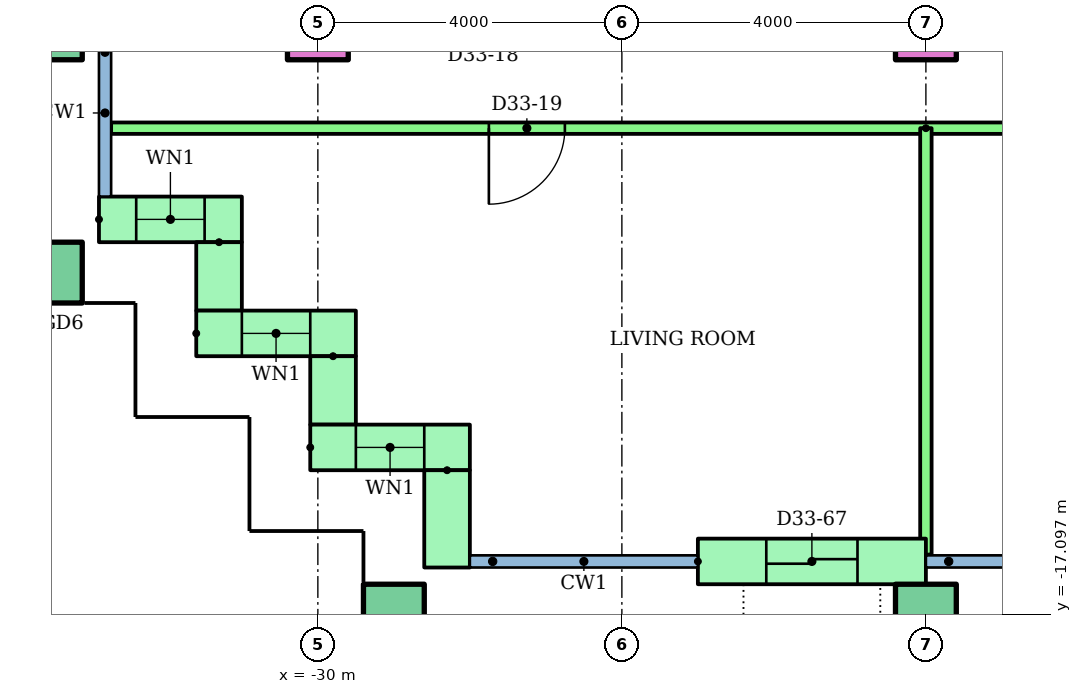
"""IFC4 building model, lengths in metres.
Left out: names, types, materials, properties, quantities, classifications, styles, units other than length and angle.
Written with IfcOpenShell. Run it as: python <this file> out.ifc"""

import sys

from ifc_helpers import new_model, si_unit, direction, frame, frame_2d, origin, origin_2d, place, context, subcontext, project, spatial, rectangle, hollow_rectangle, extrude, element, fill, save


model = new_model("IFC4")
c1 = context("Model", 3, precision=1e-05, world=origin(), true_north=direction((0.0, 1.0)))
c2 = subcontext(c1, "Body", "Model", "MODEL_VIEW")
j1 = project(units=[si_unit("LENGTHUNIT", "METRE"), si_unit("PLANEANGLEUNIT", "RADIAN")], contexts=[c1])
p1 = place(None, origin())
s1 = spatial("IfcSite", under=j1, at=p1, CompositionType="ELEMENT")
p2 = place(p1, origin())
s2 = spatial("IfcBuilding", under=s1, at=p2, CompositionType="ELEMENT")
p3 = place(p2, frame((0.0, 0.0, 129.4)))
s3 = spatial("IfcBuildingStorey", under=s2, at=p3, CompositionType="ELEMENT", Elevation=129.4)
for number, where in (
    (1, (-29.0, -17.1, 0.0)),
    (2, (-22.0, -17.1, 0.0)),
    (3, (-33.5, -12.6, 0.0)),
    (4, (-33.5, -9.4, 0.0)),
):
    element("IfcColumn", number, at=place(p3, frame(where)), inside=s3, PredefinedType="COLUMN", context=c2, shape_type="SweptSolid", body=[
        extrude(hollow_rectangle(XDim=0.8, YDim=0.8, WallThickness=0.04, at=origin_2d()), origin(), (0.0, 0.0, 1.0), 3.2),
    ])
for number, where in (
    (5, (-30.0, -9.4, 0.0)),
    (6, (-22.0, -9.4, 0.0)),
):
    element("IfcColumn", number, at=place(p3, frame(where)), inside=s3, PredefinedType="COLUMN", context=c2, shape_type="SweptSolid", body=[
        extrude(rectangle(XDim=0.8, YDim=0.8, at=origin_2d()), origin(), (0.0, 0.0, 1.0), 3.2),
    ])
p4 = place(p3, frame((-32.88, -11.9, 0.0)))
e7 = element("IfcWall", 7, at=p4, inside=s3, PredefinedType="STANDARD", context=c2, shape_type="SweptSolid", body=[
    extrude(rectangle(XDim=1.88, YDim=0.6, at=frame_2d((0.94, 0.0))), origin(), (0.0, 0.0, 1.0), 2.92),
])
p5 = place(p4, frame((0.49, 0.0, 0.9)))
e8 = element("IfcOpeningElement", 8, at=p5, cuts=e7, PredefinedType="OPENING", context=c2, shape_type="SweptSolid", body=[
    extrude(rectangle(XDim=0.9, YDim=1.5, at=frame_2d((0.45, 0.75))), frame((0.0, 0.31, 0.0), z_axis=(0.0, -1.0, 0.0), x_axis=(1.0, 0.0, 0.0)), (0.0, 0.0, 1.0), 0.62),
])
p6 = place(p3, frame((-31.3, -12.2, 0.0), z_axis=(0.0, 0.0, 1.0), x_axis=(0.0, -1.0, 0.0)))
e9 = element("IfcWall", 9, at=p6, inside=s3, PredefinedType="STANDARD", context=c2, shape_type="SweptSolid", body=[
    extrude(rectangle(XDim=0.9, YDim=0.6, at=frame_2d((0.45, 0.0))), origin(), (0.0, 0.0, 1.0), 2.92),
])
p7 = place(p3, frame((-31.6, -13.4, 0.0)))
e10 = element("IfcWall", 10, at=p7, inside=s3, PredefinedType="STANDARD", context=c2, shape_type="SweptSolid", body=[
    extrude(rectangle(XDim=2.1, YDim=0.6, at=frame_2d((1.05, 0.0))), origin(), (0.0, 0.0, 1.0), 2.92),
])
p8 = place(p7, frame((0.6, 0.0, 0.9)))
e11 = element("IfcOpeningElement", 11, at=p8, cuts=e10, PredefinedType="OPENING", context=c2, shape_type="SweptSolid", body=[
    extrude(rectangle(XDim=0.9, YDim=1.5, at=frame_2d((0.45, 0.75))), frame((0.0, 0.31, 0.0), z_axis=(0.0, -1.0, 0.0), x_axis=(1.0, 0.0, 0.0)), (0.0, 0.0, 1.0), 0.62),
])
p9 = place(p3, frame((-29.8, -13.7, 0.0), z_axis=(0.0, 0.0, 1.0), x_axis=(0.0, -1.0, 0.0)))
e12 = element("IfcWall", 12, at=p9, inside=s3, PredefinedType="STANDARD", context=c2, shape_type="SweptSolid", body=[
    extrude(rectangle(XDim=0.9, YDim=0.6, at=frame_2d((0.45, 0.0))), origin(), (0.0, 0.0, 1.0), 2.92),
])
p10 = place(p3, frame((-30.1, -14.9, 0.0)))
e13 = element("IfcWall", 13, at=p10, inside=s3, PredefinedType="STANDARD", context=c2, shape_type="SweptSolid", body=[
    extrude(rectangle(XDim=2.1, YDim=0.6, at=frame_2d((1.05, 0.0))), origin(), (0.0, 0.0, 1.0), 2.92),
])
p11 = place(p10, frame((0.6, 0.0, 0.9)))
e14 = element("IfcOpeningElement", 14, at=p11, cuts=e13, PredefinedType="OPENING", context=c2, shape_type="SweptSolid", body=[
    extrude(rectangle(XDim=0.9, YDim=1.5, at=frame_2d((0.45, 0.75))), frame((0.0, 0.31, 0.0), z_axis=(0.0, -1.0, 0.0), x_axis=(1.0, 0.0, 0.0)), (0.0, 0.0, 1.0), 0.62),
])
p12 = place(p3, frame((-28.3, -15.2, 0.0), z_axis=(0.0, 0.0, 1.0), x_axis=(0.0, -1.0, 0.0)))
e15 = element("IfcWall", 15, at=p12, inside=s3, PredefinedType="STANDARD", context=c2, shape_type="SweptSolid", body=[
    extrude(rectangle(XDim=1.28, YDim=0.6, at=frame_2d((0.64, 0.0))), origin(), (0.0, 0.0, 1.0), 2.92),
])
p13 = place(p3, frame((-25.0, -16.4, 0.0)))
e16 = element("IfcWall", 16, at=p13, inside=s3, PredefinedType="STANDARD", context=c2, shape_type="SweptSolid", body=[
    extrude(rectangle(XDim=3.0, YDim=0.6, at=frame_2d((1.5, 0.0))), origin(), (0.0, 0.0, 1.0), 2.92),
])
p14 = place(p13, frame((0.9, 0.0, 0.0)))
e17 = element("IfcOpeningElement", 17, at=p14, cuts=e16, PredefinedType="OPENING", context=c2, shape_type="SweptSolid", body=[
    extrude(rectangle(XDim=1.2, YDim=2.1, at=frame_2d((0.6, 1.05))), frame((0.0, 0.31, 0.0), z_axis=(0.0, -1.0, 0.0), x_axis=(1.0, 0.0, 0.0)), (0.0, 0.0, 1.0), 0.62),
])
p15 = place(p3, frame((-6.0, -10.7, 0.0), z_axis=(0.0, 0.0, 1.0), x_axis=(-1.0, 0.0, 0.0)))
e18 = element("IfcWall", 18, at=p15, inside=s3, PredefinedType="PARTITIONING", context=c2, shape_type="SweptSolid", body=[
    extrude(rectangle(XDim=26.72, YDim=0.15, at=frame_2d((13.36, 0.0))), origin(), (0.0, 0.0, 1.0), 2.4),
])
p16 = place(p15, frame((20.75, 0.0, 0.0)))
e19 = element("IfcOpeningElement", 19, at=p16, cuts=e18, PredefinedType="OPENING", context=c2, shape_type="SweptSolid", body=[
    extrude(rectangle(XDim=1.0, YDim=2.1, at=frame_2d((0.5, 1.05))), frame((0.0, 0.085, 0.0), z_axis=(0.0, -1.0, 0.0), x_axis=(1.0, 0.0, 0.0)), (0.0, 0.0, 1.0), 0.17),
])
p17 = place(p15, frame((13.55, 0.0, 0.0)))
e20 = element("IfcOpeningElement", 20, at=p17, cuts=e18, PredefinedType="OPENING", context=c2, shape_type="SweptSolid", body=[
    extrude(rectangle(XDim=0.9, YDim=2.1, at=frame_2d((0.45, 1.05))), frame((0.0, 0.085, 0.0), z_axis=(0.0, -1.0, 0.0), x_axis=(1.0, 0.0, 0.0)), (0.0, 0.0, 1.0), 0.17),
])
p18 = place(p15, frame((9.55, 0.0, 0.0)))
e21 = element("IfcOpeningElement", 21, at=p18, cuts=e18, PredefinedType="OPENING", context=c2, shape_type="SweptSolid", body=[
    extrude(rectangle(XDim=0.9, YDim=2.1, at=frame_2d((0.45, 1.05))), frame((0.0, 0.085, 0.0), z_axis=(0.0, -1.0, 0.0), x_axis=(1.0, 0.0, 0.0)), (0.0, 0.0, 1.0), 0.17),
])
p19 = place(p15, frame((5.55, 0.0, 0.0)))
e22 = element("IfcOpeningElement", 22, at=p19, cuts=e18, PredefinedType="OPENING", context=c2, shape_type="SweptSolid", body=[
    extrude(rectangle(XDim=0.9, YDim=2.1, at=frame_2d((0.45, 1.05))), frame((0.0, 0.085, 0.0), z_axis=(0.0, -1.0, 0.0), x_axis=(1.0, 0.0, 0.0)), (0.0, 0.0, 1.0), 0.17),
])
p20 = place(p15, frame((1.55, 0.0, 0.0)))
e23 = element("IfcOpeningElement", 23, at=p20, cuts=e18, PredefinedType="OPENING", context=c2, shape_type="SweptSolid", body=[
    extrude(rectangle(XDim=0.9, YDim=2.1, at=frame_2d((0.45, 1.05))), frame((0.0, 0.085, 0.0), z_axis=(0.0, -1.0, 0.0), x_axis=(1.0, 0.0, 0.0)), (0.0, 0.0, 1.0), 0.17),
])
p21 = place(p3, frame((-22.0, -10.7, 0.0), z_axis=(0.0, 0.0, 1.0), x_axis=(0.0, -1.0, 0.0)))
e24 = element("IfcWall", 24, at=p21, inside=s3, PredefinedType="PARTITIONING", context=c2, shape_type="SweptSolid", body=[
    extrude(rectangle(XDim=5.61, YDim=0.15, at=frame_2d((2.805, 0.0))), origin(), (0.0, 0.0, 1.0), 2.4),
])
p22 = place(p5, origin())
e25 = element("IfcWindow", 25, at=p22, inside=s3, PartitioningType="SINGLE_PANEL", PredefinedType="WINDOW", context=c2, shape_type="SweptSolid", body=[
    extrude(rectangle(XDim=0.9, YDim=1.5, at=frame_2d((0.45, 0.75))), frame((0.0, 0.03, 0.0), z_axis=(0.0, -1.0, 0.0), x_axis=(1.0, 0.0, 0.0)), (0.0, 0.0, 1.0), 0.06),
])
fill(e8, e25)
p23 = place(p8, origin())
e26 = element("IfcWindow", 26, at=p23, inside=s3, PartitioningType="SINGLE_PANEL", PredefinedType="WINDOW", context=c2, shape_type="SweptSolid", body=[
    extrude(rectangle(XDim=0.9, YDim=1.5, at=frame_2d((0.45, 0.75))), frame((0.0, 0.03, 0.0), z_axis=(0.0, -1.0, 0.0), x_axis=(1.0, 0.0, 0.0)), (0.0, 0.0, 1.0), 0.06),
])
fill(e11, e26)
p24 = place(p11, origin())
e27 = element("IfcWindow", 27, at=p24, inside=s3, PartitioningType="SINGLE_PANEL", PredefinedType="WINDOW", context=c2, shape_type="SweptSolid", body=[
    extrude(rectangle(XDim=0.9, YDim=1.5, at=frame_2d((0.45, 0.75))), frame((0.0, 0.03, 0.0), z_axis=(0.0, -1.0, 0.0), x_axis=(1.0, 0.0, 0.0)), (0.0, 0.0, 1.0), 0.06),
])
fill(e14, e27)
p25 = place(p16, origin())
e28 = element("IfcDoor", 28, at=p25, inside=s3, OperationType="SINGLE_SWING_RIGHT", PredefinedType="DOOR", context=c2, shape_type="SweptSolid", body=[
    extrude(rectangle(XDim=1.0, YDim=2.1, at=frame_2d((0.5, 1.05))), frame((0.0, 0.025, 0.0), z_axis=(0.0, -1.0, 0.0), x_axis=(1.0, 0.0, 0.0)), (0.0, 0.0, 1.0), 0.05),
])
fill(e19, e28)
p26 = place(p14, origin())
e29 = element("IfcDoor", 29, at=p26, inside=s3, OperationType="SLIDING_TO_LEFT", PredefinedType="DOOR", context=c2, shape_type="SweptSolid", body=[
    extrude(rectangle(XDim=1.2, YDim=2.1, at=frame_2d((0.6, 1.05))), frame((0.0, 0.025, 0.0), z_axis=(0.0, -1.0, 0.0), x_axis=(1.0, 0.0, 0.0)), (0.0, 0.0, 1.0), 0.05),
])
fill(e17, e29)
save(model, sys.argv[1])
